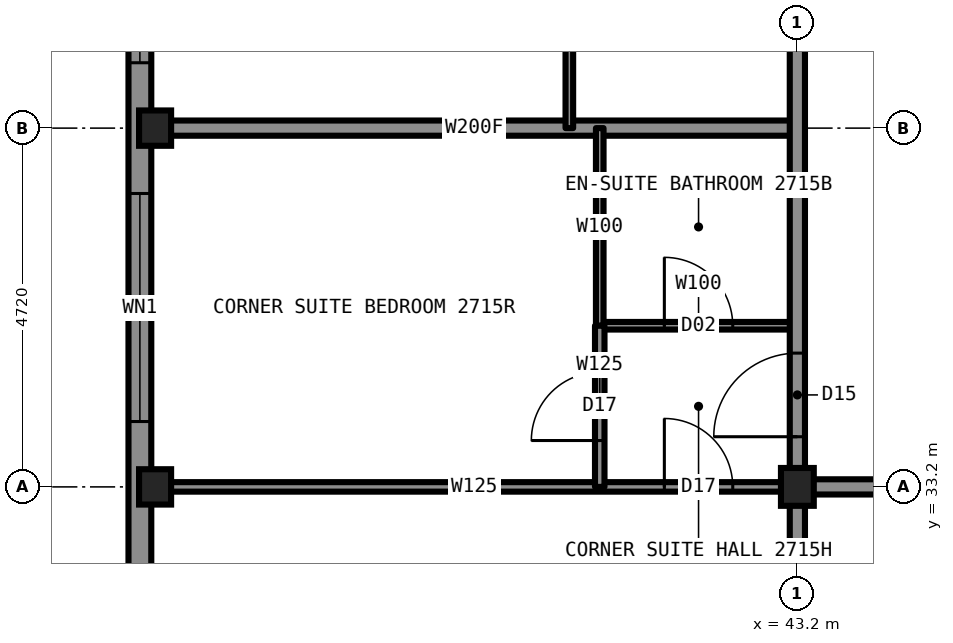
"""IFC4 building model, lengths in metres.
Left out: names, types, materials, properties, quantities, classifications, styles, units other than length and angle.
Written with IfcOpenShell. Run it as: python <this file> out.ifc"""

import sys

from ifc_helpers import new_model, si_unit, direction, frame, frame_2d, origin, origin_2d, place, context, subcontext, project, spatial, rectangle, i_section, extrude, element, fill, save


model = new_model("IFC4")
c1 = context("Model", 3, precision=1e-05, world=origin(), true_north=direction((0.0, 1.0)))
c2 = subcontext(c1, "Body", "Model", "MODEL_VIEW")
j1 = project(units=[si_unit("LENGTHUNIT", "METRE"), si_unit("PLANEANGLEUNIT", "RADIAN")], contexts=[c1])
p1 = place(None, origin())
s1 = spatial("IfcSite", under=j1, at=p1, CompositionType="ELEMENT")
p2 = place(p1, origin())
s2 = spatial("IfcBuilding", under=s1, at=p2, CompositionType="ELEMENT")
p3 = place(p2, frame((0.0, 0.0, 103.9)))
s3 = spatial("IfcBuildingStorey", under=s2, at=p3, CompositionType="ELEMENT", Elevation=103.9)
for number, where, z_axis, x_axis in (
    (1, (34.75, 33.2, 0.0), (0.0, 0.0, 1.0), (1.0, 0.0, 0.0)),
    (2, (34.75, 37.92, 0.0), (0.0, 0.0, 1.0), (1.0, 0.0, 0.0)),
):
    element("IfcColumn", number, at=place(p3, frame(where, z_axis=z_axis, x_axis=x_axis)), inside=s3, PredefinedType="COLUMN", context=c2, shape_type="SweptSolid", body=[
        extrude(i_section(OverallWidth=0.422, OverallDepth=0.465, WebThickness=0.045, FlangeThickness=0.073, at=origin_2d()), origin(), (0.0, 0.0, 1.0), 3.5),
    ])
p4 = place(p3, frame((43.2, 33.2, 0.0), z_axis=(0.0, 0.0, 1.0), x_axis=(1.0, 0.0, 0.0)))
e3 = element("IfcColumn", 3, at=p4, inside=s3, PredefinedType="COLUMN", context=c2, shape_type="SweptSolid", body=[
    extrude(i_section(OverallWidth=0.432, OverallDepth=0.498, WebThickness=0.056, FlangeThickness=0.089, at=origin_2d()), origin(), (0.0, 0.0, 1.0), 3.5),
])
p5 = place(p3, frame((43.2, 33.2, 0.0), z_axis=(0.0, 0.0, 1.0), x_axis=(1.0, 0.0, 0.0)))
e4 = element("IfcWall", 4, at=p5, inside=s3, PredefinedType="PARTITIONING", context=c2, shape_type="SweptSolid", body=[
    extrude(rectangle(XDim=23.6, YDim=0.2, at=frame_2d((11.8, 0.0))), origin(), (0.0, 0.0, 1.0), 3.33),
])
p6 = place(p5, frame((3.0, 0.0, 0.0)))
e5 = element("IfcOpeningElement", 5, at=p6, cuts=e4, PredefinedType="OPENING", context=c2, shape_type="SweptSolid", body=[
    extrude(rectangle(XDim=1.0, YDim=2.2, at=frame_2d((0.5, 1.1))), frame((0.0, 0.11, 0.0), z_axis=(0.0, -1.0, 0.0), x_axis=(1.0, 0.0, 0.0)), (0.0, 0.0, 1.0), 0.22),
])
p7 = place(p5, frame((12.44, 0.0, 0.0)))
e6 = element("IfcOpeningElement", 6, at=p7, cuts=e4, PredefinedType="OPENING", context=c2, shape_type="SweptSolid", body=[
    extrude(rectangle(XDim=1.0, YDim=2.2, at=frame_2d((0.5, 1.1))), frame((0.0, 0.11, 0.0), z_axis=(0.0, -1.0, 0.0), x_axis=(1.0, 0.0, 0.0)), (0.0, 0.0, 1.0), 0.22),
])
p8 = place(p5, frame((21.43, 0.0, 0.0)))
e7 = element("IfcOpeningElement", 7, at=p8, cuts=e4, PredefinedType="OPENING", context=c2, shape_type="SweptSolid", body=[
    extrude(rectangle(XDim=1.0, YDim=2.2, at=frame_2d((0.5, 1.1))), frame((0.0, 0.11, 0.0), z_axis=(0.0, -1.0, 0.0), x_axis=(1.0, 0.0, 0.0)), (0.0, 0.0, 1.0), 0.22),
])
p9 = place(p3, frame((34.7, 33.2, 0.0), z_axis=(0.0, 0.0, 1.0), x_axis=(1.0, 0.0, 0.0)))
e8 = element("IfcWall", 8, at=p9, inside=s3, PredefinedType="PARTITIONING", context=c2, shape_type="SweptSolid", body=[
    extrude(rectangle(XDim=8.5, YDim=0.125, at=frame_2d((4.25, 0.0))), origin(), (0.0, 0.0, 1.0), 2.573),
])
p10 = place(p9, frame((6.75, 0.0, 0.0)))
e9 = element("IfcOpeningElement", 9, at=p10, cuts=e8, PredefinedType="OPENING", context=c2, shape_type="SweptSolid", body=[
    extrude(rectangle(XDim=0.9, YDim=2.2, at=frame_2d((0.45, 1.1))), frame((0.0, 0.073, 0.0), z_axis=(0.0, -1.0, 0.0), x_axis=(1.0, 0.0, 0.0)), (0.0, 0.0, 1.0), 0.145),
])
p11 = place(p3, frame((34.7, 37.92, 0.0), z_axis=(0.0, 0.0, 1.0), x_axis=(1.0, 0.0, 0.0)))
e10 = element("IfcWall", 10, at=p11, inside=s3, PredefinedType="PARTITIONING", context=c2, shape_type="SweptSolid", body=[
    extrude(rectangle(XDim=8.5, YDim=0.2, at=frame_2d((4.25, 0.0))), origin(), (0.0, 0.0, 1.0), 2.573),
])
p12 = place(p3, frame((40.6, 35.32, 0.0), z_axis=(0.0, 0.0, 1.0), x_axis=(1.0, 0.0, 0.0)))
e11 = element("IfcWall", 11, at=p12, inside=s3, PredefinedType="PARTITIONING", context=c2, shape_type="SweptSolid", body=[
    extrude(rectangle(XDim=2.6, YDim=0.1, at=frame_2d((1.3, 0.0))), origin(), (0.0, 0.0, 1.0), 3.33),
])
p13 = place(p12, frame((0.85, 0.0, 0.0)))
e12 = element("IfcOpeningElement", 12, at=p13, cuts=e11, PredefinedType="OPENING", context=c2, shape_type="SweptSolid", body=[
    extrude(rectangle(XDim=0.9, YDim=2.1, at=frame_2d((0.45, 1.05))), frame((0.0, 0.06, 0.0), z_axis=(0.0, -1.0, 0.0), x_axis=(1.0, 0.0, 0.0)), (0.0, 0.0, 1.0), 0.12),
])
p14 = place(p3, frame((43.2, 33.2, 0.0), z_axis=(0.0, 0.0, 1.0), x_axis=(0.0, 1.0, 0.0)))
e13 = element("IfcWall", 13, at=p14, inside=s3, PredefinedType="PARTITIONING", context=c2, shape_type="SweptSolid", body=[
    extrude(rectangle(XDim=23.58, YDim=0.2, at=frame_2d((11.79, 0.0))), origin(), (0.0, 0.0, 1.0), 3.33),
])
p15 = place(p14, frame((7.72, 0.0, 0.0)))
e14 = element("IfcOpeningElement", 14, at=p15, cuts=e13, PredefinedType="OPENING", context=c2, shape_type="SweptSolid", body=[
    extrude(rectangle(XDim=1.0, YDim=2.2, at=frame_2d((0.5, 1.1))), frame((0.0, 0.11, 0.0), z_axis=(0.0, -1.0, 0.0), x_axis=(1.0, 0.0, 0.0)), (0.0, 0.0, 1.0), 0.22),
])
p16 = place(p14, frame((14.56, 0.0, 0.0)))
e15 = element("IfcOpeningElement", 15, at=p16, cuts=e13, PredefinedType="OPENING", context=c2, shape_type="SweptSolid", body=[
    extrude(rectangle(XDim=1.0, YDim=2.2, at=frame_2d((0.5, 1.1))), frame((0.0, 0.11, 0.0), z_axis=(0.0, -1.0, 0.0), x_axis=(1.0, 0.0, 0.0)), (0.0, 0.0, 1.0), 0.22),
])
p17 = place(p14, frame((21.84, 0.0, 0.0)))
e16 = element("IfcOpeningElement", 16, at=p17, cuts=e13, PredefinedType="OPENING", context=c2, shape_type="SweptSolid", body=[
    extrude(rectangle(XDim=1.1, YDim=2.2, at=frame_2d((0.55, 1.1))), frame((0.0, 0.11, 0.0), z_axis=(0.0, -1.0, 0.0), x_axis=(1.0, 0.0, 0.0)), (0.0, 0.0, 1.0), 0.22),
])
p18 = place(p14, frame((0.66, 0.0, 0.0)))
e17 = element("IfcOpeningElement", 17, at=p18, cuts=e13, PredefinedType="OPENING", context=c2, shape_type="SweptSolid", body=[
    extrude(rectangle(XDim=1.1, YDim=2.2, at=frame_2d((0.55, 1.1))), frame((0.0, 0.11, 0.0), z_axis=(0.0, -1.0, 0.0), x_axis=(1.0, 0.0, 0.0)), (0.0, 0.0, 1.0), 0.22),
])
p19 = place(p3, frame((43.2, 24.7, 0.0), z_axis=(0.0, 0.0, 1.0), x_axis=(0.0, 1.0, 0.0)))
e18 = element("IfcWall", 18, at=p19, inside=s3, PredefinedType="PARTITIONING", context=c2, shape_type="SweptSolid", body=[
    extrude(rectangle(XDim=8.5, YDim=0.2, at=frame_2d((4.25, 0.0))), origin(), (0.0, 0.0, 1.0), 2.573),
])
p20 = place(p3, frame((40.6, 35.32, 0.0), z_axis=(0.0, 0.0, 1.0), x_axis=(0.0, 1.0, 0.0)))
e19 = element("IfcWall", 19, at=p20, inside=s3, PredefinedType="PARTITIONING", context=c2, shape_type="SweptSolid", body=[
    extrude(rectangle(XDim=2.6, YDim=0.1, at=frame_2d((1.3, 0.0))), origin(), (0.0, 0.0, 1.0), 3.33),
])
p21 = place(p3, frame((40.6, 33.2, 0.0), z_axis=(0.0, 0.0, 1.0), x_axis=(0.0, 1.0, 0.0)))
e20 = element("IfcWall", 20, at=p21, inside=s3, PredefinedType="PARTITIONING", context=c2, shape_type="SweptSolid", body=[
    extrude(rectangle(XDim=2.12, YDim=0.125, at=frame_2d((1.06, 0.0))), origin(), (0.0, 0.0, 1.0), 3.33),
])
p22 = place(p21, frame((0.61, 0.0, 0.0)))
e21 = element("IfcOpeningElement", 21, at=p22, cuts=e20, PredefinedType="OPENING", context=c2, shape_type="SweptSolid", body=[
    extrude(rectangle(XDim=0.9, YDim=2.2, at=frame_2d((0.45, 1.1))), frame((0.0, 0.073, 0.0), z_axis=(0.0, -1.0, 0.0), x_axis=(1.0, 0.0, 0.0)), (0.0, 0.0, 1.0), 0.145),
])
p23 = place(p3, frame((40.2, 37.92, 0.0), z_axis=(0.0, 0.0, 1.0), x_axis=(0.0, 1.0, 0.0)))
e22 = element("IfcWall", 22, at=p23, inside=s3, PredefinedType="PARTITIONING", context=c2, shape_type="SweptSolid", body=[
    extrude(rectangle(XDim=2.6, YDim=0.1, at=frame_2d((1.3, 0.0))), origin(), (0.0, 0.0, 1.0), 3.33),
])
p24 = place(p3, frame((34.55, 60.1, 0.0), z_axis=(0.0, 0.0, 1.0), x_axis=(0.0, -1.0, 0.0)))
e23 = element("IfcWall", 23, at=p24, inside=s3, PredefinedType="SOLIDWALL", context=c2, shape_type="SweptSolid", body=[
    extrude(rectangle(XDim=30.2, YDim=0.3, at=frame_2d((15.1, 0.0))), origin(), (0.0, 0.0, 1.0), 2.83),
])
p25 = place(p24, frame((4.16, 0.0, 0.5)))
e24 = element("IfcOpeningElement", 24, at=p25, cuts=e23, PredefinedType="OPENING", context=c2, shape_type="SweptSolid", body=[
    extrude(rectangle(XDim=3.0, YDim=2.0, at=frame_2d((1.5, 1.0))), frame((0.0, 0.16, 0.0), z_axis=(0.0, -1.0, 0.0), x_axis=(1.0, 0.0, 0.0)), (0.0, 0.0, 1.0), 0.32),
])
p26 = place(p24, frame((8.88, 0.0, 0.5)))
e25 = element("IfcOpeningElement", 25, at=p26, cuts=e23, PredefinedType="OPENING", context=c2, shape_type="SweptSolid", body=[
    extrude(rectangle(XDim=3.0, YDim=2.0, at=frame_2d((1.5, 1.0))), frame((0.0, 0.16, 0.0), z_axis=(0.0, -1.0, 0.0), x_axis=(1.0, 0.0, 0.0)), (0.0, 0.0, 1.0), 0.32),
])
p27 = place(p24, frame((13.6, 0.0, 0.5)))
e26 = element("IfcOpeningElement", 26, at=p27, cuts=e23, PredefinedType="OPENING", context=c2, shape_type="SweptSolid", body=[
    extrude(rectangle(XDim=3.0, YDim=2.0, at=frame_2d((1.5, 1.0))), frame((0.0, 0.16, 0.0), z_axis=(0.0, -1.0, 0.0), x_axis=(1.0, 0.0, 0.0)), (0.0, 0.0, 1.0), 0.32),
])
p28 = place(p24, frame((18.32, 0.0, 0.5)))
e27 = element("IfcOpeningElement", 27, at=p28, cuts=e23, PredefinedType="OPENING", context=c2, shape_type="SweptSolid", body=[
    extrude(rectangle(XDim=3.0, YDim=2.0, at=frame_2d((1.5, 1.0))), frame((0.0, 0.16, 0.0), z_axis=(0.0, -1.0, 0.0), x_axis=(1.0, 0.0, 0.0)), (0.0, 0.0, 1.0), 0.32),
])
p29 = place(p24, frame((23.04, 0.0, 0.5)))
e28 = element("IfcOpeningElement", 28, at=p29, cuts=e23, PredefinedType="OPENING", context=c2, shape_type="SweptSolid", body=[
    extrude(rectangle(XDim=3.0, YDim=2.0, at=frame_2d((1.5, 1.0))), frame((0.0, 0.16, 0.0), z_axis=(0.0, -1.0, 0.0), x_axis=(1.0, 0.0, 0.0)), (0.0, 0.0, 1.0), 0.32),
])
p30 = place(p10, origin())
e29 = element("IfcDoor", 29, at=p30, inside=s3, OperationType="SINGLE_SWING_LEFT", PredefinedType="DOOR", context=c2, shape_type="SweptSolid", body=[
    extrude(rectangle(XDim=0.9, YDim=2.2, at=frame_2d((0.45, 1.1))), frame((0.0, 0.025, 0.0), z_axis=(0.0, -1.0, 0.0), x_axis=(1.0, 0.0, 0.0)), (0.0, 0.0, 1.0), 0.05),
])
fill(e9, e29)
p31 = place(p13, origin())
e30 = element("IfcDoor", 30, at=p31, inside=s3, OperationType="SINGLE_SWING_RIGHT", PredefinedType="DOOR", context=c2, shape_type="SweptSolid", body=[
    extrude(rectangle(XDim=0.9, YDim=2.1, at=frame_2d((0.45, 1.05))), frame((0.0, 0.025, 0.0), z_axis=(0.0, -1.0, 0.0), x_axis=(1.0, 0.0, 0.0)), (0.0, 0.0, 1.0), 0.05),
])
fill(e12, e30)
p32 = place(p18, origin())
e31 = element("IfcDoor", 31, at=p32, inside=s3, OperationType="SINGLE_SWING_LEFT", PredefinedType="DOOR", context=c2, shape_type="SweptSolid", body=[
    extrude(rectangle(XDim=1.1, YDim=2.2, at=frame_2d((0.55, 1.1))), frame((0.0, 0.025, 0.0), z_axis=(0.0, -1.0, 0.0), x_axis=(1.0, 0.0, 0.0)), (0.0, 0.0, 1.0), 0.05),
])
fill(e17, e31)
p33 = place(p22, origin())
e32 = element("IfcDoor", 32, at=p33, inside=s3, OperationType="SINGLE_SWING_LEFT", PredefinedType="DOOR", context=c2, shape_type="SweptSolid", body=[
    extrude(rectangle(XDim=0.9, YDim=2.2, at=frame_2d((0.45, 1.1))), frame((0.0, 0.025, 0.0), z_axis=(0.0, -1.0, 0.0), x_axis=(1.0, 0.0, 0.0)), (0.0, 0.0, 1.0), 0.05),
])
fill(e21, e32)
p34 = place(p28, origin())
e33 = element("IfcWindow", 33, at=p34, inside=s3, PartitioningType="SINGLE_PANEL", PredefinedType="WINDOW", context=c2, shape_type="SweptSolid", body=[
    extrude(rectangle(XDim=3.0, YDim=2.0, at=frame_2d((1.5, 1.0))), frame((0.0, 0.03, 0.0), z_axis=(0.0, -1.0, 0.0), x_axis=(1.0, 0.0, 0.0)), (0.0, 0.0, 1.0), 0.06),
])
fill(e27, e33)
p35 = place(p29, origin())
e34 = element("IfcWindow", 34, at=p35, inside=s3, PartitioningType="SINGLE_PANEL", PredefinedType="WINDOW", context=c2, shape_type="SweptSolid", body=[
    extrude(rectangle(XDim=3.0, YDim=2.0, at=frame_2d((1.5, 1.0))), frame((0.0, 0.03, 0.0), z_axis=(0.0, -1.0, 0.0), x_axis=(1.0, 0.0, 0.0)), (0.0, 0.0, 1.0), 0.06),
])
fill(e28, e34)
save(model, sys.argv[1])
